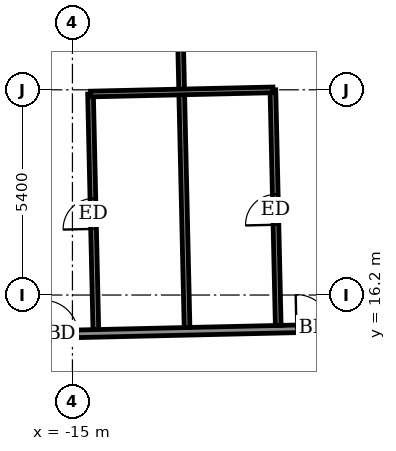
"""IFC4 building model, lengths in metres.
Left out: names, types, materials, properties, quantities, classifications, styles, units other than length and angle.
Written with IfcOpenShell. Run it as: python <this file> out.ifc"""

import sys

from ifc_helpers import new_model, si_unit, direction, frame, frame_2d, origin, place, context, subcontext, project, spatial, rectangle, extrude, element, fill, save


model = new_model("IFC4")
c1 = context("Model", 3, precision=1e-05, world=origin(), true_north=direction((0.0, 1.0)))
c2 = subcontext(c1, "Body", "Model", "MODEL_VIEW")
j1 = project(units=[si_unit("LENGTHUNIT", "METRE"), si_unit("PLANEANGLEUNIT", "RADIAN")], contexts=[c1])
p1 = place(None, origin())
s1 = spatial("IfcSite", under=j1, at=p1, CompositionType="ELEMENT")
p2 = place(p1, origin())
s2 = spatial("IfcBuilding", under=s1, at=p2, CompositionType="ELEMENT")
p3 = place(p2, frame((0.0, 0.0, 297.9)))
s3 = spatial("IfcBuildingStorey", under=s2, at=p3, CompositionType="ELEMENT", Elevation=297.9)
p4 = place(p3, frame((-26.401, 14.918, 0.0), z_axis=(0.0, 0.0, 1.0), x_axis=(0.99974239733, 0.022696673341, 0.0)))
e1 = element("IfcWall", 1, at=p4, inside=s3, PredefinedType="PARTITIONING", context=c2, shape_type="SweptSolid", body=[
    extrude(rectangle(XDim=55.386, YDim=0.2, at=frame_2d((27.693, 0.0))), origin(), (0.0, 0.0, 1.0), 3.05),
])
p5 = place(p4, frame((53.718, 0.0, 0.0)))
e2 = element("IfcOpeningElement", 2, at=p5, cuts=e1, PredefinedType="OPENING", context=c2, shape_type="SweptSolid", body=[
    extrude(rectangle(XDim=1.0, YDim=2.1, at=frame_2d((0.5, 1.05))), frame((0.0, 0.11, 0.0), z_axis=(0.0, -1.0, 0.0), x_axis=(1.0, 0.0, 0.0)), (0.0, 0.0, 1.0), 0.22),
])
p6 = place(p4, frame((49.325, 0.0, 0.0)))
e3 = element("IfcOpeningElement", 3, at=p6, cuts=e1, PredefinedType="OPENING", context=c2, shape_type="SweptSolid", body=[
    extrude(rectangle(XDim=0.9, YDim=2.1, at=frame_2d((0.45, 1.05))), frame((0.0, 0.11, 0.0), z_axis=(0.0, -1.0, 0.0), x_axis=(1.0, 0.0, 0.0)), (0.0, 0.0, 1.0), 0.22),
])
p7 = place(p4, frame((44.575, 0.0, 0.0)))
e4 = element("IfcOpeningElement", 4, at=p7, cuts=e1, PredefinedType="OPENING", context=c2, shape_type="SweptSolid", body=[
    extrude(rectangle(XDim=0.9, YDim=2.1, at=frame_2d((0.45, 1.05))), frame((0.0, 0.11, 0.0), z_axis=(0.0, -1.0, 0.0), x_axis=(1.0, 0.0, 0.0)), (0.0, 0.0, 1.0), 0.22),
])
p8 = place(p4, frame((42.725, 0.0, 0.0)))
e5 = element("IfcOpeningElement", 5, at=p8, cuts=e1, PredefinedType="OPENING", context=c2, shape_type="SweptSolid", body=[
    extrude(rectangle(XDim=0.9, YDim=2.1, at=frame_2d((0.45, 1.05))), frame((0.0, 0.11, 0.0), z_axis=(0.0, -1.0, 0.0), x_axis=(1.0, 0.0, 0.0)), (0.0, 0.0, 1.0), 0.22),
])
p9 = place(p4, frame((36.1, 0.0, 0.0)))
e6 = element("IfcOpeningElement", 6, at=p9, cuts=e1, PredefinedType="OPENING", context=c2, shape_type="SweptSolid", body=[
    extrude(rectangle(XDim=0.9, YDim=2.1, at=frame_2d((0.45, 1.05))), frame((0.0, 0.11, 0.0), z_axis=(0.0, -1.0, 0.0), x_axis=(1.0, 0.0, 0.0)), (0.0, 0.0, 1.0), 0.22),
])
p10 = place(p4, frame((34.25, 0.0, 0.0)))
e7 = element("IfcOpeningElement", 7, at=p10, cuts=e1, PredefinedType="OPENING", context=c2, shape_type="SweptSolid", body=[
    extrude(rectangle(XDim=0.9, YDim=2.1, at=frame_2d((0.45, 1.05))), frame((0.0, 0.11, 0.0), z_axis=(0.0, -1.0, 0.0), x_axis=(1.0, 0.0, 0.0)), (0.0, 0.0, 1.0), 0.22),
])
p11 = place(p4, frame((27.6, 0.0, 0.0)))
e8 = element("IfcOpeningElement", 8, at=p11, cuts=e1, PredefinedType="OPENING", context=c2, shape_type="SweptSolid", body=[
    extrude(rectangle(XDim=0.9, YDim=2.1, at=frame_2d((0.45, 1.05))), frame((0.0, 0.11, 0.0), z_axis=(0.0, -1.0, 0.0), x_axis=(1.0, 0.0, 0.0)), (0.0, 0.0, 1.0), 0.22),
])
p12 = place(p4, frame((25.775, 0.0, 0.0)))
e9 = element("IfcOpeningElement", 9, at=p12, cuts=e1, PredefinedType="OPENING", context=c2, shape_type="SweptSolid", body=[
    extrude(rectangle(XDim=0.9, YDim=2.1, at=frame_2d((0.45, 1.05))), frame((0.0, 0.11, 0.0), z_axis=(0.0, -1.0, 0.0), x_axis=(1.0, 0.0, 0.0)), (0.0, 0.0, 1.0), 0.22),
])
p13 = place(p4, frame((19.15, 0.0, 0.0)))
e10 = element("IfcOpeningElement", 10, at=p13, cuts=e1, PredefinedType="OPENING", context=c2, shape_type="SweptSolid", body=[
    extrude(rectangle(XDim=0.9, YDim=2.1, at=frame_2d((0.45, 1.05))), frame((0.0, 0.11, 0.0), z_axis=(0.0, -1.0, 0.0), x_axis=(1.0, 0.0, 0.0)), (0.0, 0.0, 1.0), 0.22),
])
p14 = place(p4, frame((17.3, 0.0, 0.0)))
e11 = element("IfcOpeningElement", 11, at=p14, cuts=e1, PredefinedType="OPENING", context=c2, shape_type="SweptSolid", body=[
    extrude(rectangle(XDim=0.9, YDim=2.1, at=frame_2d((0.45, 1.05))), frame((0.0, 0.11, 0.0), z_axis=(0.0, -1.0, 0.0), x_axis=(1.0, 0.0, 0.0)), (0.0, 0.0, 1.0), 0.22),
])
p15 = place(p4, frame((10.65, 0.0, 0.0)))
e12 = element("IfcOpeningElement", 12, at=p15, cuts=e1, PredefinedType="OPENING", context=c2, shape_type="SweptSolid", body=[
    extrude(rectangle(XDim=0.9, YDim=2.1, at=frame_2d((0.45, 1.05))), frame((0.0, 0.11, 0.0), z_axis=(0.0, -1.0, 0.0), x_axis=(1.0, 0.0, 0.0)), (0.0, 0.0, 1.0), 0.22),
])
p16 = place(p4, frame((8.8, 0.0, 0.0)))
e13 = element("IfcOpeningElement", 13, at=p16, cuts=e1, PredefinedType="OPENING", context=c2, shape_type="SweptSolid", body=[
    extrude(rectangle(XDim=0.9, YDim=2.1, at=frame_2d((0.45, 1.05))), frame((0.0, 0.11, 0.0), z_axis=(0.0, -1.0, 0.0), x_axis=(1.0, 0.0, 0.0)), (0.0, 0.0, 1.0), 0.22),
])
p17 = place(p4, frame((1.864, 0.0, 0.0)))
e14 = element("IfcOpeningElement", 14, at=p17, cuts=e1, PredefinedType="OPENING", context=c2, shape_type="SweptSolid", body=[
    extrude(rectangle(XDim=1.0, YDim=2.1, at=frame_2d((0.5, 1.05))), frame((0.0, 0.11, 0.0), z_axis=(0.0, -1.0, 0.0), x_axis=(1.0, 0.0, 0.0)), (0.0, 0.0, 1.0), 0.22),
])
p18 = place(p3, frame((-14.384, 15.291, 0.0), z_axis=(0.0, 0.0, 1.0), x_axis=(-0.022564860101, 0.999745381129, 0.0)))
e15 = element("IfcWall", 15, at=p18, inside=s3, PredefinedType="PARTITIONING", context=c2, shape_type="SweptSolid", body=[
    extrude(rectangle(XDim=6.199, YDim=0.15, at=frame_2d((3.1, 0.0))), origin(), (0.0, 0.0, 1.0), 3.05),
])
p19 = place(p18, frame((2.65, 0.0, 0.0)))
e16 = element("IfcOpeningElement", 16, at=p19, cuts=e15, PredefinedType="OPENING", context=c2, shape_type="SweptSolid", body=[
    extrude(rectangle(XDim=0.8, YDim=2.1, at=frame_2d((0.4, 1.05))), frame((0.0, 0.085, 0.0), z_axis=(0.0, -1.0, 0.0), x_axis=(1.0, 0.0, 0.0)), (0.0, 0.0, 1.0), 0.17),
])
p20 = place(p3, frame((-11.984, 15.345, 0.0), z_axis=(0.0, 0.0, 1.0), x_axis=(-0.02273928012, 0.99974142914, 0.0)))
e17 = element("IfcWall", 17, at=p20, inside=s3, PredefinedType="PARTITIONING", context=c2, shape_type="SweptSolid", body=[
    extrude(rectangle(XDim=12.1, YDim=0.15, at=frame_2d((6.05, 0.0))), origin(), (0.0, 0.0, 1.0), 2.5),
])
p21 = place(p3, frame((-9.585, 15.4, 0.0), z_axis=(0.0, 0.0, 1.0), x_axis=(-0.022604220207, 0.999744491972, 0.0)))
e18 = element("IfcWall", 18, at=p21, inside=s3, PredefinedType="PARTITIONING", context=c2, shape_type="SweptSolid", body=[
    extrude(rectangle(XDim=6.199, YDim=0.15, at=frame_2d((3.1, 0.0))), origin(), (0.0, 0.0, 1.0), 3.05),
])
p22 = place(p21, frame((2.65, 0.0, 0.0)))
e19 = element("IfcOpeningElement", 19, at=p22, cuts=e18, PredefinedType="OPENING", context=c2, shape_type="SweptSolid", body=[
    extrude(rectangle(XDim=0.8, YDim=2.1, at=frame_2d((0.4, 1.05))), frame((0.0, 0.085, 0.0), z_axis=(0.0, -1.0, 0.0), x_axis=(1.0, 0.0, 0.0)), (0.0, 0.0, 1.0), 0.17),
])
p23 = place(p3, frame((-14.522, 21.489, 0.0), z_axis=(0.0, 0.0, 1.0), x_axis=(0.999742701292, 0.022683280499, 0.0)))
e20 = element("IfcWall", 20, at=p23, inside=s3, PredefinedType="PARTITIONING", context=c2, shape_type="SweptSolid", body=[
    extrude(rectangle(XDim=4.8, YDim=0.15, at=frame_2d((2.4, 0.0))), origin(), (0.0, 0.0, 1.0), 3.05),
])
p24 = place(p14, origin())
e21 = element("IfcDoor", 21, at=p24, inside=s3, OperationType="SINGLE_SWING_LEFT", PredefinedType="DOOR", context=c2, shape_type="SweptSolid", body=[
    extrude(rectangle(XDim=0.9, YDim=2.1, at=frame_2d((0.45, 1.05))), frame((0.0, 0.025, 0.0), z_axis=(0.0, -1.0, 0.0), x_axis=(1.0, 0.0, 0.0)), (0.0, 0.0, 1.0), 0.05),
])
fill(e11, e21)
p25 = place(p22, origin())
e22 = element("IfcDoor", 22, at=p25, inside=s3, OperationType="SINGLE_SWING_LEFT", PredefinedType="DOOR", context=c2, shape_type="SweptSolid", body=[
    extrude(rectangle(XDim=0.8, YDim=2.1, at=frame_2d((0.4, 1.05))), frame((0.0, 0.025, 0.0), z_axis=(0.0, -1.0, 0.0), x_axis=(1.0, 0.0, 0.0)), (0.0, 0.0, 1.0), 0.05),
])
fill(e19, e22)
p26 = place(p15, origin())
e23 = element("IfcDoor", 23, at=p26, inside=s3, OperationType="SINGLE_SWING_RIGHT", PredefinedType="DOOR", context=c2, shape_type="SweptSolid", body=[
    extrude(rectangle(XDim=0.9, YDim=2.1, at=frame_2d((0.45, 1.05))), frame((0.0, 0.025, 0.0), z_axis=(0.0, -1.0, 0.0), x_axis=(1.0, 0.0, 0.0)), (0.0, 0.0, 1.0), 0.05),
])
fill(e12, e23)
p27 = place(p19, origin())
e24 = element("IfcDoor", 24, at=p27, inside=s3, OperationType="SINGLE_SWING_RIGHT", PredefinedType="DOOR", context=c2, shape_type="SweptSolid", body=[
    extrude(rectangle(XDim=0.8, YDim=2.1, at=frame_2d((0.4, 1.05))), frame((0.0, 0.025, 0.0), z_axis=(0.0, -1.0, 0.0), x_axis=(1.0, 0.0, 0.0)), (0.0, 0.0, 1.0), 0.05),
])
fill(e16, e24)
save(model, sys.argv[1])
